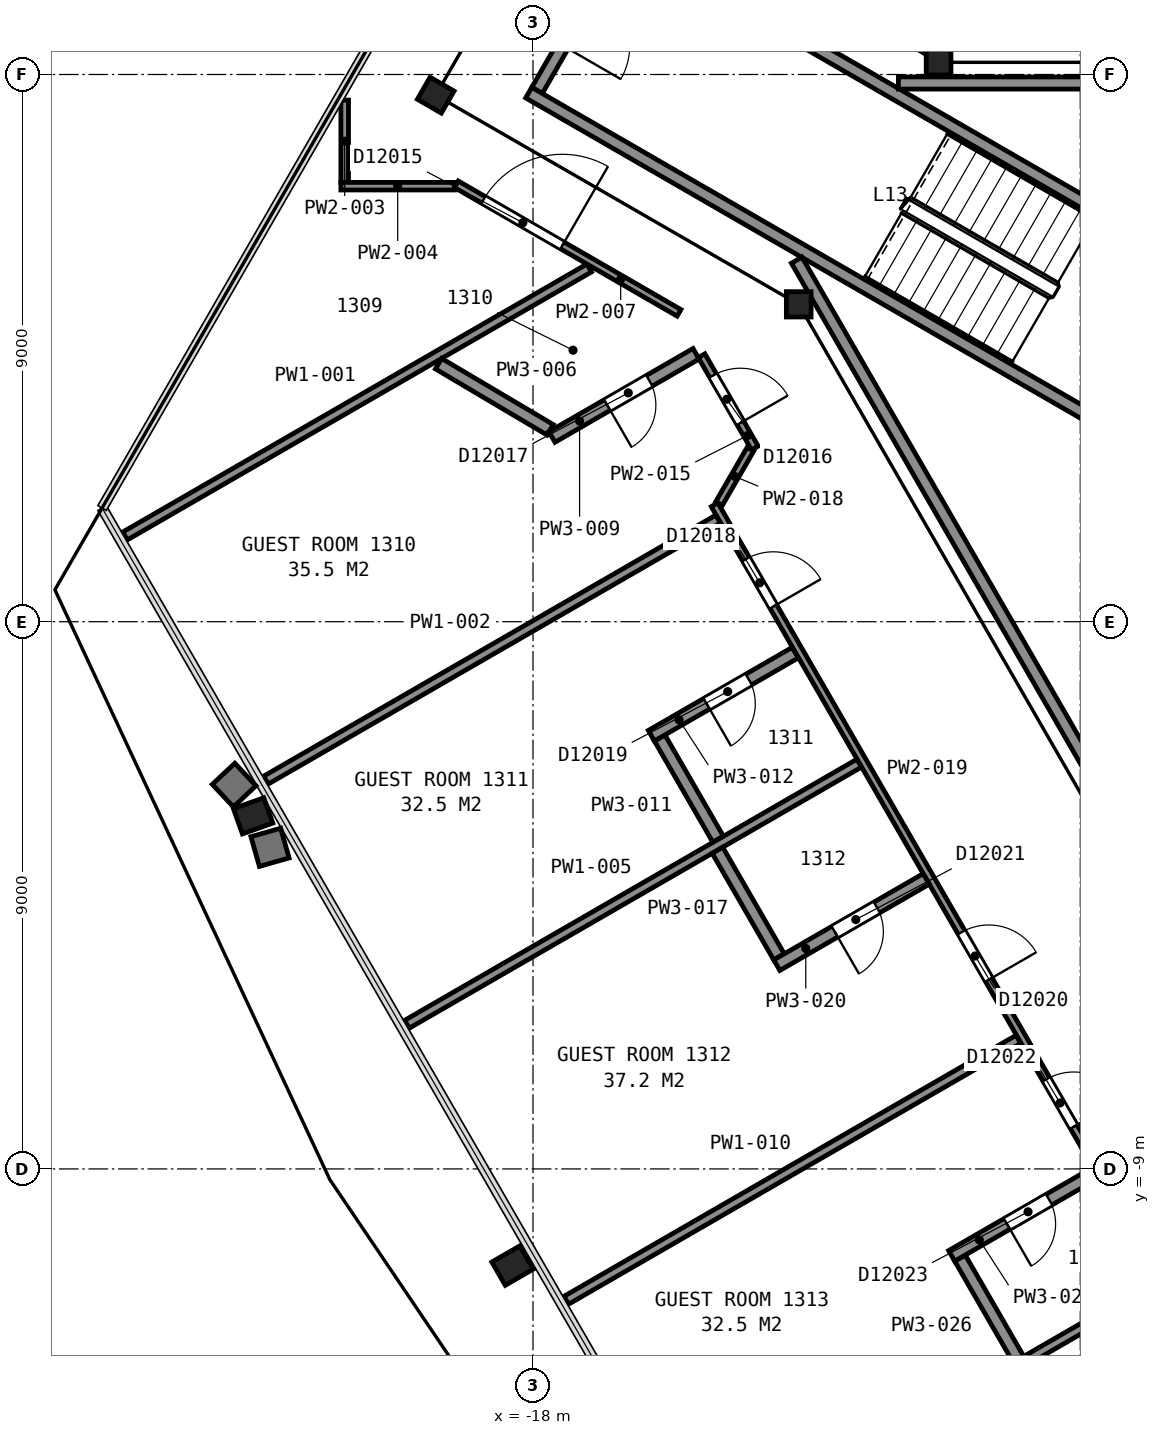
"""IFC4 building model, lengths in metres.
Left out: names, types, materials, properties, quantities, classifications, styles, units other than length and angle.
Written with IfcOpenShell. Run it as: python <this file> out.ifc"""

import sys

from ifc_helpers import new_model, si_unit, direction, frame, frame_2d, origin, origin_2d, place, context, subcontext, project, spatial, rectangle, i_section, extrude, element, fill, save


model = new_model("IFC4")
c1 = context("Model", 3, precision=1e-05, world=origin(), true_north=direction((0.0, 1.0)))
c2 = subcontext(c1, "Body", "Model", "MODEL_VIEW")
j1 = project(units=[si_unit("LENGTHUNIT", "METRE"), si_unit("PLANEANGLEUNIT", "RADIAN")], contexts=[c1])
p1 = place(None, origin())
s1 = spatial("IfcSite", under=j1, at=p1, CompositionType="ELEMENT")
p2 = place(p1, origin())
s2 = spatial("IfcBuilding", under=s1, at=p2, CompositionType="ELEMENT")
p3 = place(p2, frame((0.0, 0.0, 62.0)))
s3 = spatial("IfcBuildingStorey", under=s2, at=p3, CompositionType="ELEMENT", Elevation=62.0)
p4 = place(p3, frame((-22.512, -3.161, 0.025), z_axis=(-0.077516125089, -0.027689225938, 0.996606520708), x_axis=(-0.499992893591, 0.865902493262, -0.014831672882)))
e1 = element("IfcColumn", 1, at=p4, inside=s3, PredefinedType="COLUMN", context=c2, shape_type="SweptSolid", body=[
    extrude(i_section(OverallWidth=0.442, OverallDepth=0.531, WebThickness=0.066, FlangeThickness=0.106, FilletRadius=0.015, at=origin_2d()), origin(), (0.0, 0.0, 1.0), 3.562),
])
p5 = place(p3, frame((-18.252, -10.541, 0.025), z_axis=(-0.072028126388, -0.041530965358, 0.996537569751), x_axis=(-0.499785583529, 0.866149161394, -2.670081e-05)))
e2 = element("IfcColumn", 2, at=p5, inside=s3, PredefinedType="COLUMN", context=c2, shape_type="SweptSolid", body=[
    extrude(i_section(OverallWidth=0.442, OverallDepth=0.531, WebThickness=0.066, FlangeThickness=0.106, FilletRadius=0.015, at=origin_2d()), origin(), (0.0, 0.0, 1.0), 3.562),
])
p6 = place(p3, frame((-11.33, 9.2, 0.0), z_axis=(0.0, 0.0, 1.0), x_axis=(1.0, 0.0, 0.0)))
e3 = element("IfcColumn", 3, at=p6, inside=s3, PredefinedType="COLUMN", context=c2, shape_type="SweptSolid", body=[
    extrude(i_section(OverallWidth=0.406, OverallDepth=0.417, WebThickness=0.03, FlangeThickness=0.048, FilletRadius=0.015, at=origin_2d()), origin(), (0.0, 0.0, 1.0), 3.6),
])
p7 = place(p3, frame((-19.6, 8.66, 0.0), z_axis=(0.0, 0.0, 1.0), x_axis=(0.5, 0.866025403784, 0.0)))
e4 = element("IfcColumn", 4, at=p7, inside=s3, PredefinedType="COLUMN", context=c2, shape_type="SweptSolid", body=[
    extrude(i_section(OverallWidth=0.419, OverallDepth=0.455, WebThickness=0.042, FlangeThickness=0.068, FilletRadius=0.015, at=origin_2d()), origin(), (0.0, 0.0, 1.0), 3.6),
])
p8 = place(p3, frame((-13.63, 5.22, 0.0), z_axis=(0.0, 0.0, 1.0), x_axis=(1.0, 0.0, 0.0)))
e5 = element("IfcColumn", 5, at=p8, inside=s3, PredefinedType="COLUMN", context=c2, shape_type="SweptSolid", body=[
    extrude(i_section(OverallWidth=0.406, OverallDepth=0.417, WebThickness=0.03, FlangeThickness=0.048, FilletRadius=0.015, at=origin_2d()), origin(), (0.0, 0.0, 1.0), 3.6),
])
p9 = place(p3, frame((-16.534, 11.162, 0.0), z_axis=(0.0, 0.0, 1.0), x_axis=(-0.49998411664, -0.866034573852, 0.0)))
e6 = element("IfcWall", 6, at=p9, inside=s3, PredefinedType="PARTITIONING", context=c2, shape_type="SweptSolid", body=[
    extrude(rectangle(XDim=2.8, YDim=0.2, at=frame_2d((1.4, 0.0))), origin(), (0.0, 0.0, 1.0), 3.35),
])
p10 = place(p9, frame((0.85, 0.0, 0.0)))
e7 = element("IfcOpeningElement", 7, at=p10, cuts=e6, PredefinedType="OPENING", context=c2, shape_type="SweptSolid", body=[
    extrude(rectangle(XDim=1.1, YDim=2.1, at=frame_2d((0.55, 1.05))), frame((0.0, 0.11, 0.0), z_axis=(0.0, -1.0, 0.0), x_axis=(1.0, 0.0, 0.0)), (0.0, 0.0, 1.0), 0.22),
])
for number, where, z_axis, x_axis in (
    (8, (-7.678, 2.701, 0.0), (0.0, 0.0, 1.0), (-0.866, 0.5, 0.0)),
    (9, (-6.178, 5.299, 0.0), (0.0, 0.0, 1.0), (-0.866, 0.5, 0.0)),
):
    element("IfcWall", number, at=place(p3, frame(where, z_axis=z_axis, x_axis=x_axis)), inside=s3, PredefinedType="PARTITIONING", context=c2, shape_type="SweptSolid", body=[
        extrude(rectangle(XDim=12.0, YDim=0.2, at=frame_2d((6.0, 0.0))), origin(), (0.0, 0.0, 1.0), 3.35),
    ])
p11 = place(p3, frame((-13.664, 5.946, 0.0), z_axis=(0.0, 0.0, 1.0), x_axis=(0.499994327219, -0.866028678941, 0.0)))
e10 = element("IfcWall", 10, at=p11, inside=s3, PredefinedType="PARTITIONING", context=c2, shape_type="SweptSolid", body=[
    extrude(rectangle(XDim=23.968, YDim=0.2, at=frame_2d((11.984, 0.0))), origin(), (0.0, 0.0, 1.0), 3.35),
])
p12 = place(p3, frame((0.263, 8.86, 0.0), z_axis=(0.0, 0.0, 1.0), x_axis=(-1.0, 0.0, 0.0)))
e11 = element("IfcWall", 11, at=p12, inside=s3, PredefinedType="PARTITIONING", context=c2, shape_type="SweptSolid", body=[
    extrude(rectangle(XDim=12.254, YDim=0.2, at=frame_2d((6.127, 0.0))), origin(), (0.0, 0.0, 1.0), 3.35),
])
p13 = place(p12, frame((5.709, 0.0, 0.0)))
e12 = element("IfcOpeningElement", 12, at=p13, cuts=e11, PredefinedType="OPENING", context=c2, shape_type="SweptSolid", body=[
    extrude(rectangle(XDim=1.8, YDim=2.1, at=frame_2d((0.9, 1.05))), frame((0.0, 0.11, 0.0), z_axis=(0.0, -1.0, 0.0), x_axis=(1.0, 0.0, 0.0)), (0.0, 0.0, 1.0), 0.22),
])
p14 = place(p3, frame((-24.71, 1.41, 0.0), z_axis=(0.0, 0.0, 1.0), x_axis=(0.866020465219, 0.500008553748, 0.0)))
e13 = element("IfcWall", 13, at=p14, inside=s3, PredefinedType="PARTITIONING", context=c2, shape_type="SweptSolid", body=[
    extrude(rectangle(XDim=8.815, YDim=0.15, at=frame_2d((4.407, 0.0))), origin(), (0.0, 0.0, 1.0), 2.613),
])
p15 = place(p3, frame((-22.392, -2.605, 0.0), z_axis=(0.0, 0.0, 1.0), x_axis=(0.866031705461, 0.499989085017, 0.0)))
e14 = element("IfcWall", 14, at=p15, inside=s3, PredefinedType="PARTITIONING", context=c2, shape_type="SweptSolid", body=[
    extrude(rectangle(XDim=8.587, YDim=0.15, at=frame_2d((4.293, 0.0))), origin(), (0.0, 0.0, 1.0), 2.613),
])
p16 = place(p3, frame((-21.097, 7.228, 0.0), z_axis=(0.0, 0.0, 1.0), x_axis=(0.0, 1.0, 0.0)))
e15 = element("IfcWall", 15, at=p16, inside=s3, PredefinedType="PARTITIONING", context=c2, shape_type="SweptSolid", body=[
    extrude(rectangle(XDim=1.351, YDim=0.125, at=frame_2d((0.675, 0.0))), origin(), (0.0, 0.0, 1.0), 2.613),
])
p17 = place(p3, frame((-21.159, 7.163, 0.0), z_axis=(0.0, 0.0, 1.0), x_axis=(1.0, 0.0, 0.0)))
e16 = element("IfcWall", 16, at=p17, inside=s3, PredefinedType="PARTITIONING", context=c2, shape_type="SweptSolid", body=[
    extrude(rectangle(XDim=1.868, YDim=0.125, at=frame_2d((0.934, 0.0))), origin(), (0.0, 0.0, 1.0), 2.613),
])
p18 = place(p3, frame((-20.073, -6.621, 0.0), z_axis=(0.0, 0.0, 1.0), x_axis=(0.866029425019, 0.499993034952, 0.0)))
e17 = element("IfcWall", 17, at=p18, inside=s3, PredefinedType="PARTITIONING", context=c2, shape_type="SweptSolid", body=[
    extrude(rectangle(XDim=8.591, YDim=0.15, at=frame_2d((4.296, 0.0))), origin(), (0.0, 0.0, 1.0), 2.613),
])
p19 = place(p3, frame((-19.553, 4.243, 0.0), z_axis=(0.0, 0.0, 1.0), x_axis=(0.860468125465, -0.509504273838, 0.0)))
e18 = element("IfcWall", 18, at=p19, inside=s3, PredefinedType="PARTITIONING", context=c2, shape_type="SweptSolid", body=[
    extrude(rectangle(XDim=2.133, YDim=0.2, at=frame_2d((1.066, 0.0))), origin(), (0.0, 0.0, 1.0), 2.613),
])
p20 = place(p3, frame((-15.599, 5.08, 0.0), z_axis=(0.0, 0.0, 1.0), x_axis=(-0.865948995961, 0.500132318886, 0.0)))
e19 = element("IfcWall", 19, at=p20, inside=s3, PredefinedType="PARTITIONING", context=c2, shape_type="SweptSolid", body=[
    extrude(rectangle(XDim=4.228, YDim=0.125, at=frame_2d((2.114, 0.0))), origin(), (0.0, 0.0, 1.0), 2.613),
])
p21 = place(p20, frame((2.216, 0.0, 0.0)))
e20 = element("IfcOpeningElement", 20, at=p21, cuts=e19, PredefinedType="OPENING", context=c2, shape_type="SweptSolid", body=[
    extrude(rectangle(XDim=1.5, YDim=2.1, at=frame_2d((0.75, 1.05))), frame((0.0, 0.073, 0.0), z_axis=(0.0, -1.0, 0.0), x_axis=(1.0, 0.0, 0.0)), (0.0, 0.0, 1.0), 0.145),
])
p22 = place(p3, frame((-17.689, 3.038, 0.0), z_axis=(0.0, 0.0, 1.0), x_axis=(0.866028150195, 0.499995243048, 0.0)))
e21 = element("IfcWall", 21, at=p22, inside=s3, PredefinedType="PARTITIONING", context=c2, shape_type="SweptSolid", body=[
    extrude(rectangle(XDim=2.737, YDim=0.2, at=frame_2d((1.369, 0.0))), origin(), (0.0, 0.0, 1.0), 2.613),
])
p23 = place(p22, frame((1.05, 0.0, 0.0)))
e22 = element("IfcOpeningElement", 22, at=p23, cuts=e21, PredefinedType="OPENING", context=c2, shape_type="SweptSolid", body=[
    extrude(rectangle(XDim=0.8, YDim=2.1, at=frame_2d((0.4, 1.05))), frame((0.0, 0.11, 0.0), z_axis=(0.0, -1.0, 0.0), x_axis=(1.0, 0.0, 0.0)), (0.0, 0.0, 1.0), 0.22),
])
p24 = place(p3, frame((-17.453, -11.16, 0.0), z_axis=(0.0, 0.0, 1.0), x_axis=(0.866031705461, 0.499989085017, 0.0)))
e23 = element("IfcWall", 23, at=p24, inside=s3, PredefinedType="PARTITIONING", context=c2, shape_type="SweptSolid", body=[
    extrude(rectangle(XDim=8.587, YDim=0.15, at=frame_2d((4.293, 0.0))), origin(), (0.0, 0.0, 1.0), 2.613),
])
p25 = place(p3, frame((-15.917, -1.912, 0.0), z_axis=(0.0, 0.0, 1.0), x_axis=(0.499913221443, -0.866075499611, 0.0)))
e24 = element("IfcWall", 24, at=p25, inside=s3, PredefinedType="PARTITIONING", context=c2, shape_type="SweptSolid", body=[
    extrude(rectangle(XDim=1.92, YDim=0.2, at=frame_2d((0.96, 0.0))), origin(), (0.0, 0.0, 1.0), 2.613),
])
p26 = place(p3, frame((-13.688, -0.509, 0.0), z_axis=(0.0, 0.0, 1.0), x_axis=(-0.866012976267, -0.500021524473, 0.0)))
e25 = element("IfcWall", 25, at=p26, inside=s3, PredefinedType="PARTITIONING", context=c2, shape_type="SweptSolid", body=[
    extrude(rectangle(XDim=2.732, YDim=0.2, at=frame_2d((1.366, 0.0))), origin(), (0.0, 0.0, 1.0), 2.613),
])
p27 = place(p26, frame((0.882, 0.0, 0.0)))
e26 = element("IfcOpeningElement", 26, at=p27, cuts=e25, PredefinedType="OPENING", context=c2, shape_type="SweptSolid", body=[
    extrude(rectangle(XDim=0.8, YDim=2.1, at=frame_2d((0.4, 1.05))), frame((0.0, 0.11, 0.0), z_axis=(0.0, -1.0, 0.0), x_axis=(1.0, 0.0, 0.0)), (0.0, 0.0, 1.0), 0.22),
])
p28 = place(p3, frame((-14.351, 2.856, 0.0), z_axis=(0.0, 0.0, 1.0), x_axis=(-0.500075847163, 0.865981608976, 0.0)))
e27 = element("IfcWall", 27, at=p28, inside=s3, PredefinedType="PARTITIONING", context=c2, shape_type="SweptSolid", body=[
    extrude(rectangle(XDim=1.754, YDim=0.125, at=frame_2d((0.877, 0.0))), origin(), (0.0, 0.0, 1.0), 2.613),
])
p29 = place(p28, frame((0.477, 0.0, 0.0)))
e28 = element("IfcOpeningElement", 28, at=p29, cuts=e27, PredefinedType="OPENING", context=c2, shape_type="SweptSolid", body=[
    extrude(rectangle(XDim=0.9, YDim=2.1, at=frame_2d((0.45, 1.05))), frame((0.0, 0.073, 0.0), z_axis=(0.0, -1.0, 0.0), x_axis=(1.0, 0.0, 0.0)), (0.0, 0.0, 1.0), 0.145),
])
p30 = place(p3, frame((-15.135, -15.175, 0.0), z_axis=(0.0, 0.0, 1.0), x_axis=(0.866024224461, 0.500002042643, 0.0)))
e29 = element("IfcWall", 29, at=p30, inside=s3, PredefinedType="PARTITIONING", context=c2, shape_type="SweptSolid", body=[
    extrude(rectangle(XDim=8.592, YDim=0.15, at=frame_2d((4.296, 0.0))), origin(), (0.0, 0.0, 1.0), 2.613),
])
p31 = place(p3, frame((-14.967, -3.759, 0.0), z_axis=(0.0, 0.0, 1.0), x_axis=(0.500042536776, -0.866000843773, 0.0)))
e30 = element("IfcWall", 30, at=p31, inside=s3, PredefinedType="PARTITIONING", context=c2, shape_type="SweptSolid", body=[
    extrude(rectangle(XDim=2.025, YDim=0.2, at=frame_2d((1.012, 0.0))), origin(), (0.0, 0.0, 1.0), 2.613),
])
p32 = place(p3, frame((-14.94, 1.944, 0.0), z_axis=(0.0, 0.0, 1.0), x_axis=(0.500289431813, 0.86585823575, 0.0)))
e31 = element("IfcWall", 31, at=p32, inside=s3, PredefinedType="PARTITIONING", context=c2, shape_type="SweptSolid", body=[
    extrude(rectangle(XDim=1.031, YDim=0.125, at=frame_2d((0.516, 0.0))), origin(), (0.0, 0.0, 1.0), 2.613),
])
p33 = place(p3, frame((-3.766, -17.558, 0.0), z_axis=(0.0, 0.0, 1.0), x_axis=(-0.500008349927, 0.866020582898, 0.0)))
e32 = element("IfcWall", 32, at=p33, inside=s3, PredefinedType="PARTITIONING", context=c2, shape_type="SweptSolid", body=[
    extrude(rectangle(XDim=22.496, YDim=0.125, at=frame_2d((11.248, 0.0))), origin(), (0.0, 0.0, 1.0), 2.613),
])
p34 = place(p33, frame((20.563, 0.0, 0.0)))
e33 = element("IfcOpeningElement", 33, at=p34, cuts=e32, PredefinedType="OPENING", context=c2, shape_type="SweptSolid", body=[
    extrude(rectangle(XDim=0.9, YDim=2.1, at=frame_2d((0.45, 1.05))), frame((0.0, 0.073, 0.0), z_axis=(0.0, -1.0, 0.0), x_axis=(1.0, 0.0, 0.0)), (0.0, 0.0, 1.0), 0.145),
])
p35 = place(p33, frame((13.476, 0.0, 0.0)))
e34 = element("IfcOpeningElement", 34, at=p35, cuts=e32, PredefinedType="OPENING", context=c2, shape_type="SweptSolid", body=[
    extrude(rectangle(XDim=0.9, YDim=2.1, at=frame_2d((0.45, 1.05))), frame((0.0, 0.073, 0.0), z_axis=(0.0, -1.0, 0.0), x_axis=(1.0, 0.0, 0.0)), (0.0, 0.0, 1.0), 0.145),
])
p36 = place(p33, frame((10.684, 0.0, 0.0)))
e35 = element("IfcOpeningElement", 35, at=p36, cuts=e32, PredefinedType="OPENING", context=c2, shape_type="SweptSolid", body=[
    extrude(rectangle(XDim=0.9, YDim=2.1, at=frame_2d((0.45, 1.05))), frame((0.0, 0.073, 0.0), z_axis=(0.0, -1.0, 0.0), x_axis=(1.0, 0.0, 0.0)), (0.0, 0.0, 1.0), 0.145),
])
p37 = place(p33, frame((3.948, 0.0, 0.0)))
e36 = element("IfcOpeningElement", 36, at=p37, cuts=e32, PredefinedType="OPENING", context=c2, shape_type="SweptSolid", body=[
    extrude(rectangle(XDim=0.9, YDim=2.1, at=frame_2d((0.45, 1.05))), frame((0.0, 0.073, 0.0), z_axis=(0.0, -1.0, 0.0), x_axis=(1.0, 0.0, 0.0)), (0.0, 0.0, 1.0), 0.145),
])
p38 = place(p33, frame((1.411, 0.0, 0.0)))
e37 = element("IfcOpeningElement", 37, at=p38, cuts=e32, PredefinedType="OPENING", context=c2, shape_type="SweptSolid", body=[
    extrude(rectangle(XDim=0.9, YDim=2.1, at=frame_2d((0.45, 1.05))), frame((0.0, 0.073, 0.0), z_axis=(0.0, -1.0, 0.0), x_axis=(1.0, 0.0, 0.0)), (0.0, 0.0, 1.0), 0.145),
])
p39 = place(p3, frame((-13.991, -5.649, 0.0), z_axis=(0.0, 0.0, 1.0), x_axis=(0.866048046904, 0.499960778915, 0.0)))
e38 = element("IfcWall", 38, at=p39, inside=s3, PredefinedType="PARTITIONING", context=c2, shape_type="SweptSolid", body=[
    extrude(rectangle(XDim=2.838, YDim=0.2, at=frame_2d((1.419, 0.0))), origin(), (0.0, 0.0, 1.0), 2.613),
])
p40 = place(p39, frame((1.1, 0.0, 0.0)))
e39 = element("IfcOpeningElement", 39, at=p40, cuts=e38, PredefinedType="OPENING", context=c2, shape_type="SweptSolid", body=[
    extrude(rectangle(XDim=0.8, YDim=2.1, at=frame_2d((0.4, 1.05))), frame((0.0, 0.11, 0.0), z_axis=(0.0, -1.0, 0.0), x_axis=(1.0, 0.0, 0.0)), (0.0, 0.0, 1.0), 0.22),
])
p41 = place(p3, frame((-10.978, -10.467, 0.0), z_axis=(0.0, 0.0, 1.0), x_axis=(0.499832553123, -0.866122057702, 0.0)))
e40 = element("IfcWall", 40, at=p41, inside=s3, PredefinedType="PARTITIONING", context=c2, shape_type="SweptSolid", body=[
    extrude(rectangle(XDim=1.92, YDim=0.2, at=frame_2d((0.96, 0.0))), origin(), (0.0, 0.0, 1.0), 2.613),
])
p42 = place(p3, frame((-8.744, -9.061, 0.0), z_axis=(0.0, 0.0, 1.0), x_axis=(-0.866005850709, -0.50003386539, 0.0)))
e41 = element("IfcWall", 41, at=p42, inside=s3, PredefinedType="PARTITIONING", context=c2, shape_type="SweptSolid", body=[
    extrude(rectangle(XDim=2.737, YDim=0.2, at=frame_2d((1.369, 0.0))), origin(), (0.0, 0.0, 1.0), 2.613),
])
p43 = place(p42, frame((0.887, 0.0, 0.0)))
e42 = element("IfcOpeningElement", 42, at=p43, cuts=e41, PredefinedType="OPENING", context=c2, shape_type="SweptSolid", body=[
    extrude(rectangle(XDim=0.8, YDim=2.1, at=frame_2d((0.4, 1.05))), frame((0.0, 0.11, 0.0), z_axis=(0.0, -1.0, 0.0), x_axis=(1.0, 0.0, 0.0)), (0.0, 0.0, 1.0), 0.22),
])
p44 = place(p21, origin())
e43 = element("IfcDoor", 43, at=p44, inside=s3, OperationType="DOUBLE_DOOR_SINGLE_SWING", PredefinedType="DOOR", context=c2, shape_type="SweptSolid", body=[
    extrude(rectangle(XDim=1.5, YDim=2.1, at=frame_2d((0.75, 1.05))), frame((0.0, 0.025, 0.0), z_axis=(0.0, -1.0, 0.0), x_axis=(1.0, 0.0, 0.0)), (0.0, 0.0, 1.0), 0.05),
])
fill(e20, e43)
p45 = place(p23, origin())
e44 = element("IfcDoor", 44, at=p45, inside=s3, OperationType="SINGLE_SWING_LEFT", PredefinedType="DOOR", context=c2, shape_type="SweptSolid", body=[
    extrude(rectangle(XDim=0.8, YDim=2.1, at=frame_2d((0.4, 1.05))), frame((0.0, 0.025, 0.0), z_axis=(0.0, -1.0, 0.0), x_axis=(1.0, 0.0, 0.0)), (0.0, 0.0, 1.0), 0.05),
])
fill(e22, e44)
p46 = place(p27, origin())
e45 = element("IfcDoor", 45, at=p46, inside=s3, OperationType="SINGLE_SWING_RIGHT", PredefinedType="DOOR", context=c2, shape_type="SweptSolid", body=[
    extrude(rectangle(XDim=0.8, YDim=2.1, at=frame_2d((0.4, 1.05))), frame((0.0, 0.025, 0.0), z_axis=(0.0, -1.0, 0.0), x_axis=(1.0, 0.0, 0.0)), (0.0, 0.0, 1.0), 0.05),
])
fill(e26, e45)
p47 = place(p29, origin())
e46 = element("IfcDoor", 46, at=p47, inside=s3, OperationType="SINGLE_SWING_LEFT", PredefinedType="DOOR", context=c2, shape_type="SweptSolid", body=[
    extrude(rectangle(XDim=0.9, YDim=2.1, at=frame_2d((0.45, 1.05))), frame((0.0, 0.025, 0.0), z_axis=(0.0, -1.0, 0.0), x_axis=(1.0, 0.0, 0.0)), (0.0, 0.0, 1.0), 0.05),
])
fill(e28, e46)
p48 = place(p34, origin())
e47 = element("IfcDoor", 47, at=p48, inside=s3, OperationType="SINGLE_SWING_LEFT", PredefinedType="DOOR", context=c2, shape_type="SweptSolid", body=[
    extrude(rectangle(XDim=0.9, YDim=2.1, at=frame_2d((0.45, 1.05))), frame((0.0, 0.025, 0.0), z_axis=(0.0, -1.0, 0.0), x_axis=(1.0, 0.0, 0.0)), (0.0, 0.0, 1.0), 0.05),
])
fill(e33, e47)
p49 = place(p35, origin())
e48 = element("IfcDoor", 48, at=p49, inside=s3, OperationType="SINGLE_SWING_LEFT", PredefinedType="DOOR", context=c2, shape_type="SweptSolid", body=[
    extrude(rectangle(XDim=0.9, YDim=2.1, at=frame_2d((0.45, 1.05))), frame((0.0, 0.025, 0.0), z_axis=(0.0, -1.0, 0.0), x_axis=(1.0, 0.0, 0.0)), (0.0, 0.0, 1.0), 0.05),
])
fill(e34, e48)
p50 = place(p36, origin())
e49 = element("IfcDoor", 49, at=p50, inside=s3, OperationType="SINGLE_SWING_LEFT", PredefinedType="DOOR", context=c2, shape_type="SweptSolid", body=[
    extrude(rectangle(XDim=0.9, YDim=2.1, at=frame_2d((0.45, 1.05))), frame((0.0, 0.025, 0.0), z_axis=(0.0, -1.0, 0.0), x_axis=(1.0, 0.0, 0.0)), (0.0, 0.0, 1.0), 0.05),
])
fill(e35, e49)
p51 = place(p40, origin())
e50 = element("IfcDoor", 50, at=p51, inside=s3, OperationType="SINGLE_SWING_LEFT", PredefinedType="DOOR", context=c2, shape_type="SweptSolid", body=[
    extrude(rectangle(XDim=0.8, YDim=2.1, at=frame_2d((0.4, 1.05))), frame((0.0, 0.025, 0.0), z_axis=(0.0, -1.0, 0.0), x_axis=(1.0, 0.0, 0.0)), (0.0, 0.0, 1.0), 0.05),
])
fill(e39, e50)
p52 = place(p43, origin())
e51 = element("IfcDoor", 51, at=p52, inside=s3, OperationType="SINGLE_SWING_RIGHT", PredefinedType="DOOR", context=c2, shape_type="SweptSolid", body=[
    extrude(rectangle(XDim=0.8, YDim=2.1, at=frame_2d((0.4, 1.05))), frame((0.0, 0.025, 0.0), z_axis=(0.0, -1.0, 0.0), x_axis=(1.0, 0.0, 0.0)), (0.0, 0.0, 1.0), 0.05),
])
fill(e42, e51)
save(model, sys.argv[1])
